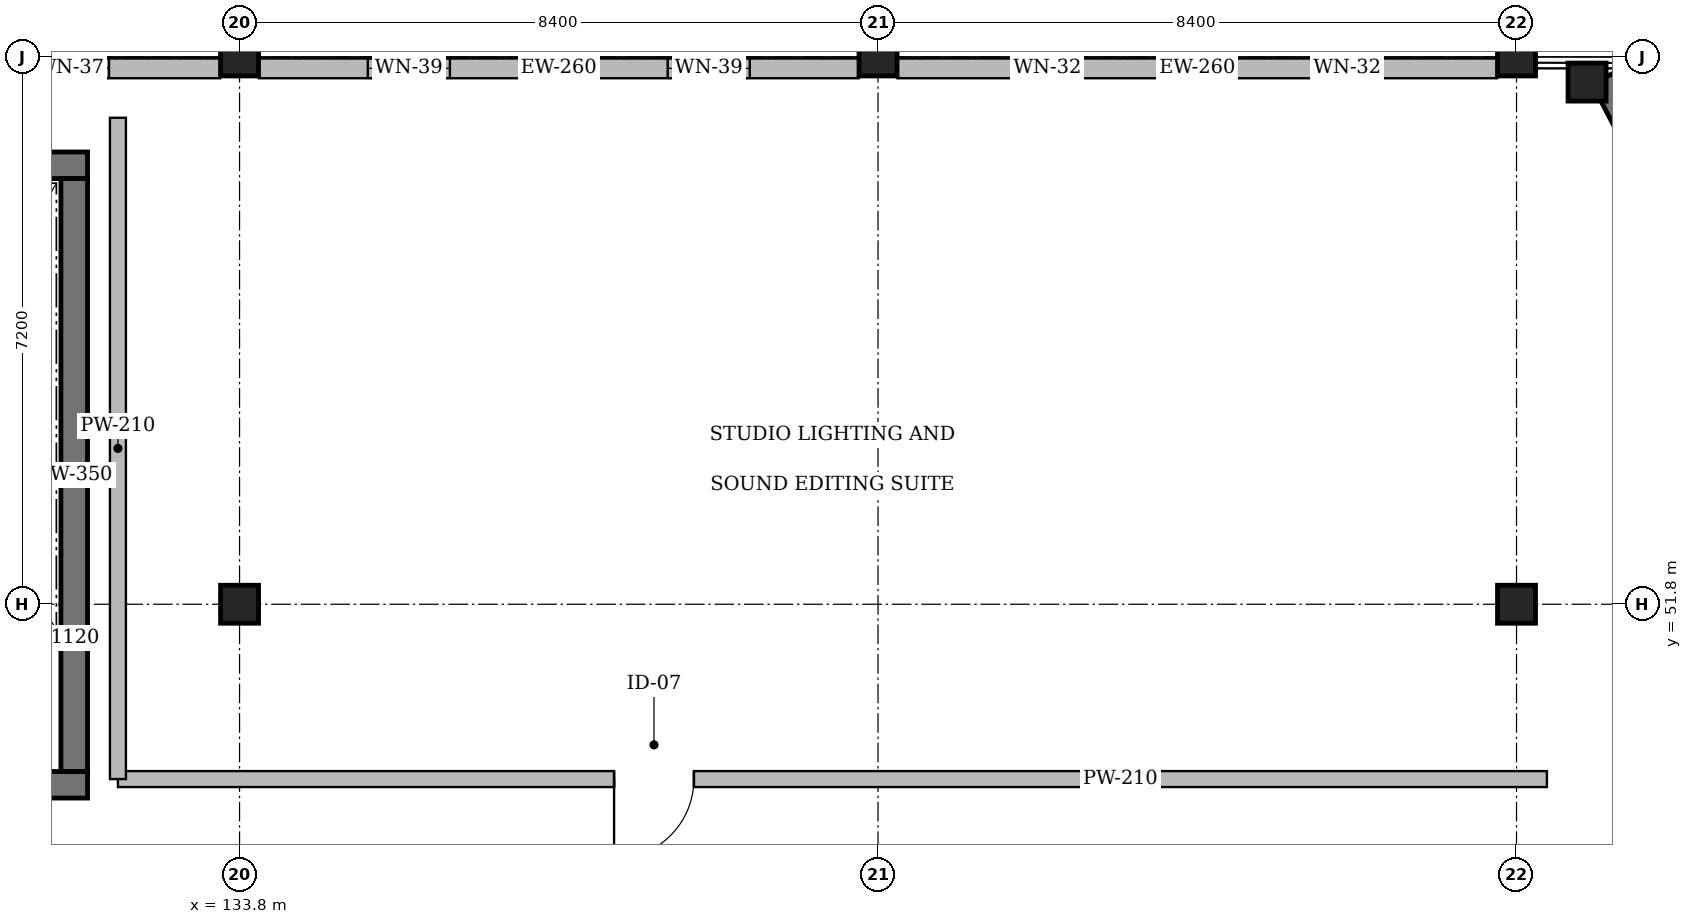
"""IFC4 building model, lengths in metres.
Left out: names, types, materials, properties, quantities, classifications, styles, units other than length and angle.
Written with IfcOpenShell. Run it as: python <this file> out.ifc"""

import sys

from ifc_helpers import new_model, si_unit, direction, frame, frame_2d, origin, origin_2d, place, context, subcontext, project, spatial, rectangle, extrude, element, fill, save


model = new_model("IFC4")
c1 = context("Model", 3, precision=1e-05, world=origin(), true_north=direction((0.0, 1.0)))
c2 = subcontext(c1, "Body", "Model", "MODEL_VIEW")
j1 = project(units=[si_unit("LENGTHUNIT", "METRE"), si_unit("PLANEANGLEUNIT", "RADIAN")], contexts=[c1])
p1 = place(None, origin())
s1 = spatial("IfcSite", under=j1, at=p1, CompositionType="ELEMENT")
p2 = place(p1, origin())
s2 = spatial("IfcBuilding", under=s1, at=p2, CompositionType="ELEMENT")
p3 = place(p2, frame((0.0, 0.0, 9.0)))
s3 = spatial("IfcBuildingStorey", under=s2, at=p3, CompositionType="ELEMENT", Elevation=9.0)
for number, where, z_axis, x_axis in (
    (1, (133.8, 51.8, 0.0), (0.0, 0.0, 1.0), (1.0, 0.0, 0.0)),
    (2, (133.8, 59.0, 0.0), (0.0, 0.0, 1.0), (1.0, 0.0, 0.0)),
    (3, (142.2, 59.0, 0.0), (0.0, 0.0, 1.0), (1.0, 0.0, 0.0)),
    (4, (150.6, 51.8, 0.0), (0.0, 0.0, 1.0), (1.0, 0.0, 0.0)),
    (5, (150.6, 59.0, 0.0), (0.0, 0.0, 1.0), (1.0, 0.0, 0.0)),
):
    element("IfcColumn", number, at=place(p3, frame(where, z_axis=z_axis, x_axis=x_axis)), inside=s3, PredefinedType="COLUMN", context=c2, shape_type="SweptSolid", body=[
        extrude(rectangle(XDim=0.5, YDim=0.5, at=origin_2d()), origin(), (0.0, 0.0, 1.0), 4.06),
    ])
p4 = place(p3, frame((151.528, 58.669, 0.0), z_axis=(0.0, 0.0, 1.0), x_axis=(1.0, 0.0, 0.0)))
e6 = element("IfcColumn", 6, at=p4, inside=s3, PredefinedType="COLUMN", context=c2, shape_type="SweptSolid", body=[
    extrude(rectangle(XDim=0.5, YDim=0.5, at=origin_2d()), origin(), (0.0, 0.0, 1.0), 4.18),
])
p5 = place(p3, frame((131.8, 49.425, 0.0), z_axis=(0.0, 0.0, 1.0), x_axis=(-1.0, 0.0, 0.0)))
e7 = element("IfcWall", 7, at=p5, inside=s3, PredefinedType="SOLIDWALL", context=c2, shape_type="SweptSolid", body=[
    extrude(rectangle(XDim=4.15, YDim=0.35, at=frame_2d((2.075, 0.0))), origin(), (0.0, 0.0, 1.0), 4.0),
])
p6 = place(p5, frame((1.525, 0.0, 0.0)))
e8 = element("IfcOpeningElement", 8, at=p6, cuts=e7, PredefinedType="OPENING", context=c2, shape_type="SweptSolid", body=[
    extrude(rectangle(XDim=1.1, YDim=2.15, at=frame_2d((0.55, 1.075))), frame((0.0, 0.195, 0.0), z_axis=(0.0, -1.0, 0.0), x_axis=(1.0, 0.0, 0.0)), (0.0, 0.0, 1.0), 0.39),
])
p7 = place(p3, frame((127.65, 57.575, 0.0), z_axis=(0.0, 0.0, 1.0), x_axis=(1.0, 0.0, 0.0)))
e9 = element("IfcWall", 9, at=p7, inside=s3, PredefinedType="SOLIDWALL", context=c2, shape_type="SweptSolid", body=[
    extrude(rectangle(XDim=4.15, YDim=0.35, at=frame_2d((2.075, 0.0))), origin(), (0.0, 0.0, 1.0), 4.0),
])
p8 = place(p3, frame((131.625, 57.4, 0.0), z_axis=(0.0, 0.0, 1.0), x_axis=(0.0, -1.0, 0.0)))
e10 = element("IfcWall", 10, at=p8, inside=s3, PredefinedType="SOLIDWALL", context=c2, shape_type="SweptSolid", body=[
    extrude(rectangle(XDim=7.8, YDim=0.35, at=frame_2d((3.9, 0.0))), origin(), (0.0, 0.0, 1.0), 4.0),
])
p9 = place(p3, frame((125.655, 58.85, 0.0), z_axis=(0.0, 0.0, 1.0), x_axis=(1.0, 0.0, 0.0)))
e11 = element("IfcWall", 11, at=p9, inside=s3, PredefinedType="SOLIDWALL", context=c2, shape_type="SweptSolid", body=[
    extrude(rectangle(XDim=7.89, YDim=0.26, at=frame_2d((3.945, 0.0))), origin(), (0.0, 0.0, 1.0), 3.293),
])
p10 = place(p9, frame((1.462, 0.0, 0.95)))
e12 = element("IfcOpeningElement", 12, at=p10, cuts=e11, PredefinedType="OPENING", context=c2, shape_type="SweptSolid", body=[
    extrude(rectangle(XDim=1.02, YDim=1.55, at=frame_2d((0.51, 0.775))), frame((0.0, 0.15, 0.0), z_axis=(0.0, -1.0, 0.0), x_axis=(1.0, 0.0, 0.0)), (0.0, 0.0, 1.0), 0.3),
])
p11 = place(p9, frame((5.407, 0.0, 0.95)))
e13 = element("IfcOpeningElement", 13, at=p11, cuts=e11, PredefinedType="OPENING", context=c2, shape_type="SweptSolid", body=[
    extrude(rectangle(XDim=1.02, YDim=1.55, at=frame_2d((0.51, 0.775))), frame((0.0, 0.15, 0.0), z_axis=(0.0, -1.0, 0.0), x_axis=(1.0, 0.0, 0.0)), (0.0, 0.0, 1.0), 0.3),
])
p12 = place(p3, frame((134.055, 58.85, 0.0), z_axis=(0.0, 0.0, 1.0), x_axis=(1.0, 0.0, 0.0)))
e14 = element("IfcWall", 14, at=p12, inside=s3, PredefinedType="SOLIDWALL", context=c2, shape_type="SweptSolid", body=[
    extrude(rectangle(XDim=7.89, YDim=0.26, at=frame_2d((3.945, 0.0))), origin(), (0.0, 0.0, 1.0), 3.293),
])
p13 = place(p12, frame((1.433, 0.0, 0.95)))
e15 = element("IfcOpeningElement", 15, at=p13, cuts=e14, PredefinedType="OPENING", context=c2, shape_type="SweptSolid", body=[
    extrude(rectangle(XDim=1.08, YDim=1.6, at=frame_2d((0.54, 0.8))), frame((0.0, 0.15, 0.0), z_axis=(0.0, -1.0, 0.0), x_axis=(1.0, 0.0, 0.0)), (0.0, 0.0, 1.0), 0.3),
])
p14 = place(p12, frame((5.377, 0.0, 0.95)))
e16 = element("IfcOpeningElement", 16, at=p14, cuts=e14, PredefinedType="OPENING", context=c2, shape_type="SweptSolid", body=[
    extrude(rectangle(XDim=1.08, YDim=1.6, at=frame_2d((0.54, 0.8))), frame((0.0, 0.15, 0.0), z_axis=(0.0, -1.0, 0.0), x_axis=(1.0, 0.0, 0.0)), (0.0, 0.0, 1.0), 0.3),
])
p15 = place(p3, frame((142.455, 58.85, 0.0), z_axis=(0.0, 0.0, 1.0), x_axis=(1.0, 0.0, 0.0)))
e17 = element("IfcWall", 17, at=p15, inside=s3, PredefinedType="SOLIDWALL", context=c2, shape_type="SweptSolid", body=[
    extrude(rectangle(XDim=7.89, YDim=0.26, at=frame_2d((3.945, 0.0))), origin(), (0.0, 0.0, 1.0), 3.293),
])
p16 = place(p15, frame((1.522, 0.0, 0.95)))
e18 = element("IfcOpeningElement", 18, at=p16, cuts=e17, PredefinedType="OPENING", context=c2, shape_type="SweptSolid", body=[
    extrude(rectangle(XDim=0.9, YDim=1.7, at=frame_2d((0.45, 0.85))), frame((0.0, 0.15, 0.0), z_axis=(0.0, -1.0, 0.0), x_axis=(1.0, 0.0, 0.0)), (0.0, 0.0, 1.0), 0.3),
])
p17 = place(p15, frame((5.468, 0.0, 0.95)))
e19 = element("IfcOpeningElement", 19, at=p17, cuts=e17, PredefinedType="OPENING", context=c2, shape_type="SweptSolid", body=[
    extrude(rectangle(XDim=0.9, YDim=1.7, at=frame_2d((0.45, 0.85))), frame((0.0, 0.15, 0.0), z_axis=(0.0, -1.0, 0.0), x_axis=(1.0, 0.0, 0.0)), (0.0, 0.0, 1.0), 0.3),
])
p18 = place(p3, frame((151.763, 58.73, 0.0), z_axis=(0.0, 0.0, 1.0), x_axis=(0.463702805056, -0.88599080615, 0.0)))
e20 = element("IfcWall", 20, at=p18, inside=s3, PredefinedType="SOLIDWALL", context=c2, shape_type="SweptSolid", body=[
    extrude(rectangle(XDim=4.439, YDim=0.38, at=frame_2d((2.219, 0.0))), origin(), (0.0, 0.0, 1.0), 4.24),
])
p19 = place(p18, frame((1.357, 0.0, 0.95)))
e21 = element("IfcOpeningElement", 21, at=p19, cuts=e20, PredefinedType="OPENING", context=c2, shape_type="SweptSolid", body=[
    extrude(rectangle(XDim=1.75, YDim=1.65, at=frame_2d((0.875, 0.825))), frame((0.0, 0.21, 0.0), z_axis=(0.0, -1.0, 0.0), x_axis=(1.0, 0.0, 0.0)), (0.0, 0.0, 1.0), 0.42),
])
p20 = place(p3, frame((151.0, 49.5, 0.0), z_axis=(0.0, 0.0, 1.0), x_axis=(-1.0, 0.0, 0.0)))
e22 = element("IfcWall", 22, at=p20, inside=s3, PredefinedType="PARTITIONING", context=c2, shape_type="SweptSolid", body=[
    extrude(rectangle(XDim=18.8, YDim=0.21, at=frame_2d((9.4, 0.0))), origin(), (0.0, 0.0, 1.0), 3.96),
])
p21 = place(p20, frame((11.222, 0.0, 0.0)))
e23 = element("IfcOpeningElement", 23, at=p21, cuts=e22, PredefinedType="OPENING", context=c2, shape_type="SweptSolid", body=[
    extrude(rectangle(XDim=1.05, YDim=2.15, at=frame_2d((0.525, 1.075))), frame((0.0, 0.125, 0.0), z_axis=(0.0, -1.0, 0.0), x_axis=(1.0, 0.0, 0.0)), (0.0, 0.0, 1.0), 0.25),
])
p22 = place(p3, frame((132.2, 49.5, 0.0), z_axis=(0.0, 0.0, 1.0), x_axis=(0.0, 1.0, 0.0)))
e24 = element("IfcWall", 24, at=p22, inside=s3, PredefinedType="PARTITIONING", context=c2, shape_type="SweptSolid", body=[
    extrude(rectangle(XDim=8.7, YDim=0.21, at=frame_2d((4.35, 0.0))), origin(), (0.0, 0.0, 1.0), 3.96),
])
p23 = place(p11, origin())
e25 = element("IfcWindow", 25, at=p23, inside=s3, PartitioningType="SINGLE_PANEL", PredefinedType="WINDOW", context=c2, shape_type="SweptSolid", body=[
    extrude(rectangle(XDim=1.02, YDim=1.55, at=frame_2d((0.51, 0.775))), frame((0.0, 0.03, 0.0), z_axis=(0.0, -1.0, 0.0), x_axis=(1.0, 0.0, 0.0)), (0.0, 0.0, 1.0), 0.06),
])
fill(e13, e25)
p24 = place(p13, origin())
e26 = element("IfcWindow", 26, at=p24, inside=s3, PartitioningType="SINGLE_PANEL", PredefinedType="WINDOW", context=c2, shape_type="SweptSolid", body=[
    extrude(rectangle(XDim=1.08, YDim=1.6, at=frame_2d((0.54, 0.8))), frame((0.0, 0.03, 0.0), z_axis=(0.0, -1.0, 0.0), x_axis=(1.0, 0.0, 0.0)), (0.0, 0.0, 1.0), 0.06),
])
fill(e15, e26)
p25 = place(p14, origin())
e27 = element("IfcWindow", 27, at=p25, inside=s3, PartitioningType="SINGLE_PANEL", PredefinedType="WINDOW", context=c2, shape_type="SweptSolid", body=[
    extrude(rectangle(XDim=1.08, YDim=1.6, at=frame_2d((0.54, 0.8))), frame((0.0, 0.03, 0.0), z_axis=(0.0, -1.0, 0.0), x_axis=(1.0, 0.0, 0.0)), (0.0, 0.0, 1.0), 0.06),
])
fill(e16, e27)
p26 = place(p16, origin())
e28 = element("IfcWindow", 28, at=p26, inside=s3, PartitioningType="SINGLE_PANEL", PredefinedType="WINDOW", context=c2, shape_type="SweptSolid", body=[
    extrude(rectangle(XDim=0.9, YDim=1.7, at=frame_2d((0.45, 0.85))), frame((0.0, 0.03, 0.0), z_axis=(0.0, -1.0, 0.0), x_axis=(1.0, 0.0, 0.0)), (0.0, 0.0, 1.0), 0.06),
])
fill(e18, e28)
p27 = place(p17, origin())
e29 = element("IfcWindow", 29, at=p27, inside=s3, PartitioningType="SINGLE_PANEL", PredefinedType="WINDOW", context=c2, shape_type="SweptSolid", body=[
    extrude(rectangle(XDim=0.9, YDim=1.7, at=frame_2d((0.45, 0.85))), frame((0.0, 0.03, 0.0), z_axis=(0.0, -1.0, 0.0), x_axis=(1.0, 0.0, 0.0)), (0.0, 0.0, 1.0), 0.06),
])
fill(e19, e29)
p28 = place(p21, origin())
e30 = element("IfcDoor", 30, at=p28, inside=s3, OperationType="SINGLE_SWING_RIGHT", PredefinedType="DOOR", context=c2, shape_type="SweptSolid", body=[
    extrude(rectangle(XDim=1.05, YDim=2.15, at=frame_2d((0.525, 1.075))), frame((0.0, 0.025, 0.0), z_axis=(0.0, -1.0, 0.0), x_axis=(1.0, 0.0, 0.0)), (0.0, 0.0, 1.0), 0.05),
])
fill(e23, e30)
save(model, sys.argv[1])
